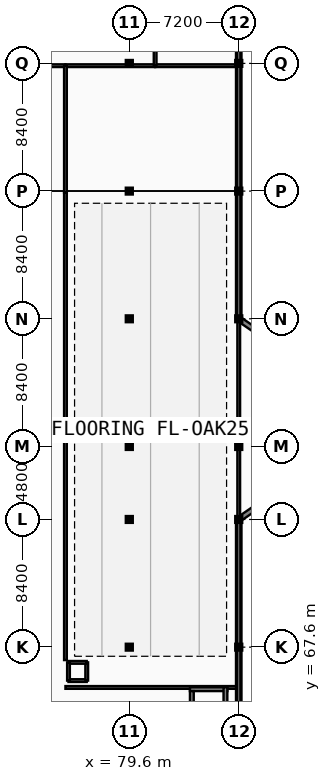
"""IFC4 building model, lengths in metres.
Left out: names, types, materials, properties, quantities, classifications, styles, units other than length and angle.
Written with IfcOpenShell. Run it as: python <this file> out.ifc"""

import sys

from ifc_helpers import new_model, si_unit, direction, frame, frame_2d, origin, origin_2d, place, context, subcontext, project, spatial, rectangle, i_section, extrude, element, fill, save


model = new_model("IFC4")
c1 = context("Model", 3, precision=1e-05, world=origin(), true_north=direction((0.0, 1.0)))
c2 = subcontext(c1, "Body", "Model", "MODEL_VIEW")
j1 = project(units=[si_unit("LENGTHUNIT", "METRE"), si_unit("PLANEANGLEUNIT", "RADIAN")], contexts=[c1])
p1 = place(None, origin())
s1 = spatial("IfcSite", under=j1, at=p1, CompositionType="ELEMENT")
p2 = place(p1, origin())
s2 = spatial("IfcBuilding", under=s1, at=p2, CompositionType="ELEMENT")
p3 = place(p2, frame((0.0, 0.0, 21.6)))
s3 = spatial("IfcBuildingStorey", under=s2, at=p3, CompositionType="ELEMENT", Elevation=21.6)
for number, where, z_axis, x_axis in (
    (1, (79.6, 67.6, 0.0), (0.0, 0.0, 1.0), (1.0, 0.0, 0.0)),
    (2, (79.6, 76.0, 0.0), (0.0, 0.0, 1.0), (1.0, 0.0, 0.0)),
    (3, (79.6, 80.8, 0.0), (0.0, 0.0, 1.0), (1.0, 0.0, 0.0)),
    (4, (79.6, 89.2, 0.0), (0.0, 0.0, 1.0), (1.0, 0.0, 0.0)),
    (5, (79.6, 97.6, 0.0), (0.0, 0.0, 1.0), (1.0, 0.0, 0.0)),
    (6, (79.6, 106.0, 0.0), (0.0, 0.0, 1.0), (1.0, 0.0, 0.0)),
    (7, (86.8, 67.6, 0.0), (0.0, 0.0, 1.0), (1.0, 0.0, 0.0)),
    (8, (86.8, 76.0, 0.0), (0.0, 0.0, 1.0), (1.0, 0.0, 0.0)),
    (9, (86.8, 80.8, 0.0), (0.0, 0.0, 1.0), (1.0, 0.0, 0.0)),
    (10, (86.8, 89.2, 0.0), (0.0, 0.0, 1.0), (1.0, 0.0, 0.0)),
    (11, (86.8, 97.6, 0.0), (0.0, 0.0, 1.0), (1.0, 0.0, 0.0)),
    (12, (86.8, 106.0, 0.0), (0.0, 0.0, 1.0), (1.0, 0.0, 0.0)),
):
    element("IfcColumn", number, at=place(p3, frame(where, z_axis=z_axis, x_axis=x_axis)), inside=s3, PredefinedType="COLUMN", context=c2, shape_type="SweptSolid", body=[
        extrude(i_section(OverallWidth=0.3, OverallDepth=0.29, WebThickness=0.009, FlangeThickness=0.014, at=origin_2d()), origin(), (0.0, 0.0, 1.0), 3.6),
    ])
p4 = place(p3, frame((60.3, 105.85, 0.0), z_axis=(0.0, 0.0, 1.0), x_axis=(1.0, 0.0, 0.0)))
e13 = element("IfcWall", 13, at=p4, inside=s3, PredefinedType="PARTITIONING", context=c2, shape_type="SweptSolid", body=[
    extrude(rectangle(XDim=15.1, YDim=0.18, at=frame_2d((7.55, 0.0))), origin(), (0.0, 0.0, 1.0), 2.71),
])
p5 = place(p4, frame((7.05, 0.0, -0.01)))
e14 = element("IfcOpeningElement", 14, at=p5, cuts=e13, PredefinedType="OPENING", context=c2, shape_type="SweptSolid", body=[
    extrude(rectangle(XDim=1.0, YDim=2.16, at=frame_2d((0.5, 1.08))), frame((0.0, 0.1, 0.0), z_axis=(0.0, -1.0, 0.0), x_axis=(1.0, 0.0, 0.0)), (0.0, 0.0, 1.0), 0.2),
])
p6 = place(p3, frame((75.4, 105.85, 0.0), z_axis=(0.0, 0.0, 1.0), x_axis=(1.0, 0.0, 0.0)))
e15 = element("IfcWall", 15, at=p6, inside=s3, PredefinedType="PARTITIONING", context=c2, shape_type="SweptSolid", body=[
    extrude(rectangle(XDim=5.9, YDim=0.18, at=frame_2d((2.95, 0.0))), origin(), (0.0, 0.0, 1.0), 2.71),
])
p7 = place(p3, frame((81.3, 105.85, 0.0), z_axis=(0.0, 0.0, 1.0), x_axis=(1.0, 0.0, 0.0)))
e16 = element("IfcWall", 16, at=p7, inside=s3, PredefinedType="PARTITIONING", context=c2, shape_type="SweptSolid", body=[
    extrude(rectangle(XDim=5.36, YDim=0.18, at=frame_2d((2.68, 0.0))), origin(), (0.0, 0.0, 1.0), 2.71),
])
p8 = place(p7, frame((2.18, 0.0, -0.01)))
e17 = element("IfcOpeningElement", 17, at=p8, cuts=e16, PredefinedType="OPENING", context=c2, shape_type="SweptSolid", body=[
    extrude(rectangle(XDim=1.0, YDim=2.16, at=frame_2d((0.5, 1.08))), frame((0.0, 0.1, 0.0), z_axis=(0.0, -1.0, 0.0), x_axis=(1.0, 0.0, 0.0)), (0.0, 0.0, 1.0), 0.2),
])
p9 = place(p3, frame((81.3, 105.85, 0.0), z_axis=(0.0, 0.0, 1.0), x_axis=(0.0, 1.0, 0.0)))
e18 = element("IfcWall", 18, at=p9, inside=s3, PredefinedType="PARTITIONING", context=c2, shape_type="SweptSolid", body=[
    extrude(rectangle(XDim=4.15, YDim=0.18, at=frame_2d((2.075, 0.0))), origin(), (0.0, 0.0, 1.0), 2.71),
])
p10 = place(p9, frame((1.575, 0.0, -0.01)))
e19 = element("IfcOpeningElement", 19, at=p10, cuts=e18, PredefinedType="OPENING", context=c2, shape_type="SweptSolid", body=[
    extrude(rectangle(XDim=1.0, YDim=2.16, at=frame_2d((0.5, 1.08))), frame((0.0, 0.1, 0.0), z_axis=(0.0, -1.0, 0.0), x_axis=(1.0, 0.0, 0.0)), (0.0, 0.0, 1.0), 0.2),
])
p11 = place(p3, frame((75.4, 64.95, 0.0), z_axis=(0.0, 0.0, 1.0), x_axis=(1.0, 0.0, 0.0)))
e20 = element("IfcWall", 20, at=p11, inside=s3, PredefinedType="PARTITIONING", context=c2, shape_type="SweptSolid", body=[
    extrude(rectangle(XDim=11.26, YDim=0.18, at=frame_2d((5.63, 0.0))), origin(), (0.0, 0.0, 1.0), 2.79),
])
p12 = place(p3, frame((75.4, 66.75, 0.0), z_axis=(0.0, 0.0, 1.0), x_axis=(0.0, 1.0, 0.0)))
e21 = element("IfcWall", 21, at=p12, inside=s3, PredefinedType="PARTITIONING", context=c2, shape_type="SweptSolid", body=[
    extrude(rectangle(XDim=30.75, YDim=0.18, at=frame_2d((15.375, 0.0))), origin(), (0.0, 0.0, 1.0), 2.71),
])
p13 = place(p12, frame((6.413, 0.0, -0.01)))
e22 = element("IfcOpeningElement", 22, at=p13, cuts=e21, PredefinedType="OPENING", context=c2, shape_type="SweptSolid", body=[
    extrude(rectangle(XDim=1.6, YDim=2.21, at=frame_2d((0.8, 1.105))), frame((0.0, 0.1, 0.0), z_axis=(0.0, -1.0, 0.0), x_axis=(1.0, 0.0, 0.0)), (0.0, 0.0, 1.0), 0.2),
])
p14 = place(p3, frame((75.4, 97.5, 0.0), z_axis=(0.0, 0.0, 1.0), x_axis=(0.0, 1.0, 0.0)))
e23 = element("IfcWall", 23, at=p14, inside=s3, PredefinedType="PARTITIONING", context=c2, shape_type="SweptSolid", body=[
    extrude(rectangle(XDim=8.35, YDim=0.18, at=frame_2d((4.175, 0.0))), origin(), (0.0, 0.0, 1.0), 2.71),
])
p15 = place(p3, frame((86.8, 76.0, 0.0), z_axis=(0.0, 0.0, 1.0), x_axis=(0.0, 1.0, 0.0)))
e24 = element("IfcWall", 24, at=p15, inside=s3, PredefinedType="PARTITIONING", context=c2, shape_type="SweptSolid", body=[
    extrude(rectangle(XDim=13.2, YDim=0.18, at=frame_2d((6.6, 0.0))), origin(), (0.0, 0.0, 1.0), 2.71),
])
p16 = place(p15, frame((5.8, 0.0, -0.01)))
e25 = element("IfcOpeningElement", 25, at=p16, cuts=e24, PredefinedType="OPENING", context=c2, shape_type="SweptSolid", body=[
    extrude(rectangle(XDim=1.6, YDim=2.21, at=frame_2d((0.8, 1.105))), frame((0.0, 0.1, 0.0), z_axis=(0.0, -1.0, 0.0), x_axis=(1.0, 0.0, 0.0)), (0.0, 0.0, 1.0), 0.2),
])
p17 = place(p3, frame((86.8, 97.6, 0.0), z_axis=(0.0, 0.0, 1.0), x_axis=(0.0, 1.0, 0.0)))
e26 = element("IfcWall", 26, at=p17, inside=s3, PredefinedType="SOLIDWALL", context=c2, shape_type="SweptSolid", body=[
    extrude(rectangle(XDim=8.4, YDim=0.36, at=frame_2d((4.2, 0.0))), origin(), (0.0, 0.0, 1.0), 2.71),
])
p18 = place(p17, frame((0.46, 0.0, 0.75)))
e27 = element("IfcOpeningElement", 27, at=p18, cuts=e26, PredefinedType="OPENING", context=c2, shape_type="SweptSolid", body=[
    extrude(rectangle(XDim=1.55, YDim=1.82, at=frame_2d((0.775, 0.91))), frame((0.0, 0.19, 0.0), z_axis=(0.0, -1.0, 0.0), x_axis=(1.0, 0.0, 0.0)), (0.0, 0.0, 1.0), 0.38),
])
p19 = place(p17, frame((6.26, 0.0, 0.75)))
e28 = element("IfcOpeningElement", 28, at=p19, cuts=e26, PredefinedType="OPENING", context=c2, shape_type="SweptSolid", body=[
    extrude(rectangle(XDim=1.55, YDim=1.82, at=frame_2d((0.775, 0.91))), frame((0.0, 0.19, 0.0), z_axis=(0.0, -1.0, 0.0), x_axis=(1.0, 0.0, 0.0)), (0.0, 0.0, 1.0), 0.38),
])
p20 = place(p3, frame((86.8, 106.0, 0.0), z_axis=(0.0, 0.0, 1.0), x_axis=(0.0, 1.0, 0.0)))
e29 = element("IfcWall", 29, at=p20, inside=s3, PredefinedType="SOLIDWALL", context=c2, shape_type="SweptSolid", body=[
    extrude(rectangle(XDim=9.0, YDim=0.36, at=frame_2d((4.5, 0.0))), origin(), (0.0, 0.0, 1.0), 2.71),
])
p21 = place(p20, frame((0.46, 0.0, 0.75)))
e30 = element("IfcOpeningElement", 30, at=p21, cuts=e29, PredefinedType="OPENING", context=c2, shape_type="SweptSolid", body=[
    extrude(rectangle(XDim=1.55, YDim=1.82, at=frame_2d((0.775, 0.91))), frame((0.0, 0.19, 0.0), z_axis=(0.0, -1.0, 0.0), x_axis=(1.0, 0.0, 0.0)), (0.0, 0.0, 1.0), 0.38),
])
p22 = place(p20, frame((6.86, 0.0, 0.75)))
e31 = element("IfcOpeningElement", 31, at=p22, cuts=e29, PredefinedType="OPENING", context=c2, shape_type="SweptSolid", body=[
    extrude(rectangle(XDim=1.55, YDim=1.82, at=frame_2d((0.775, 0.91))), frame((0.0, 0.19, 0.0), z_axis=(0.0, -1.0, 0.0), x_axis=(1.0, 0.0, 0.0)), (0.0, 0.0, 1.0), 0.38),
])
p23 = place(p3, frame((86.8, 59.2, 0.0), z_axis=(0.0, 0.0, 1.0), x_axis=(0.0, 1.0, 0.0)))
e32 = element("IfcWall", 32, at=p23, inside=s3, PredefinedType="SOLIDWALL", context=c2, shape_type="SweptSolid", body=[
    extrude(rectangle(XDim=8.4, YDim=0.36, at=frame_2d((4.2, 0.0))), origin(), (0.0, 0.0, 1.0), 2.71),
])
p24 = place(p23, frame((0.46, 0.0, 0.75)))
e33 = element("IfcOpeningElement", 33, at=p24, cuts=e32, PredefinedType="OPENING", context=c2, shape_type="SweptSolid", body=[
    extrude(rectangle(XDim=1.55, YDim=1.82, at=frame_2d((0.775, 0.91))), frame((0.0, 0.19, 0.0), z_axis=(0.0, -1.0, 0.0), x_axis=(1.0, 0.0, 0.0)), (0.0, 0.0, 1.0), 0.38),
])
p25 = place(p23, frame((6.26, 0.0, 0.75)))
e34 = element("IfcOpeningElement", 34, at=p25, cuts=e32, PredefinedType="OPENING", context=c2, shape_type="SweptSolid", body=[
    extrude(rectangle(XDim=1.55, YDim=1.82, at=frame_2d((0.775, 0.91))), frame((0.0, 0.19, 0.0), z_axis=(0.0, -1.0, 0.0), x_axis=(1.0, 0.0, 0.0)), (0.0, 0.0, 1.0), 0.38),
])
p26 = place(p3, frame((86.8, 67.6, 0.0), z_axis=(0.0, 0.0, 1.0), x_axis=(0.0, 1.0, 0.0)))
e35 = element("IfcWall", 35, at=p26, inside=s3, PredefinedType="SOLIDWALL", context=c2, shape_type="SweptSolid", body=[
    extrude(rectangle(XDim=8.4, YDim=0.36, at=frame_2d((4.2, 0.0))), origin(), (0.0, 0.0, 1.0), 2.71),
])
p27 = place(p26, frame((0.46, 0.0, 0.75)))
e36 = element("IfcOpeningElement", 36, at=p27, cuts=e35, PredefinedType="OPENING", context=c2, shape_type="SweptSolid", body=[
    extrude(rectangle(XDim=1.55, YDim=1.82, at=frame_2d((0.775, 0.91))), frame((0.0, 0.19, 0.0), z_axis=(0.0, -1.0, 0.0), x_axis=(1.0, 0.0, 0.0)), (0.0, 0.0, 1.0), 0.38),
])
p28 = place(p26, frame((6.26, 0.0, 0.75)))
e37 = element("IfcOpeningElement", 37, at=p28, cuts=e35, PredefinedType="OPENING", context=c2, shape_type="SweptSolid", body=[
    extrude(rectangle(XDim=1.55, YDim=1.82, at=frame_2d((0.775, 0.91))), frame((0.0, 0.19, 0.0), z_axis=(0.0, -1.0, 0.0), x_axis=(1.0, 0.0, 0.0)), (0.0, 0.0, 1.0), 0.38),
])
p29 = place(p3, frame((86.8, 89.2, 0.0), z_axis=(0.0, 0.0, 1.0), x_axis=(0.0, 1.0, 0.0)))
e38 = element("IfcWall", 38, at=p29, inside=s3, PredefinedType="SOLIDWALL", context=c2, shape_type="SweptSolid", body=[
    extrude(rectangle(XDim=8.4, YDim=0.36, at=frame_2d((4.2, 0.0))), origin(), (0.0, 0.0, 1.0), 2.71),
])
p30 = place(p29, frame((0.46, 0.0, 0.75)))
e39 = element("IfcOpeningElement", 39, at=p30, cuts=e38, PredefinedType="OPENING", context=c2, shape_type="SweptSolid", body=[
    extrude(rectangle(XDim=1.55, YDim=1.82, at=frame_2d((0.775, 0.91))), frame((0.0, 0.19, 0.0), z_axis=(0.0, -1.0, 0.0), x_axis=(1.0, 0.0, 0.0)), (0.0, 0.0, 1.0), 0.38),
])
p31 = place(p29, frame((6.26, 0.0, 0.75)))
e40 = element("IfcOpeningElement", 40, at=p31, cuts=e38, PredefinedType="OPENING", context=c2, shape_type="SweptSolid", body=[
    extrude(rectangle(XDim=1.55, YDim=1.82, at=frame_2d((0.775, 0.91))), frame((0.0, 0.19, 0.0), z_axis=(0.0, -1.0, 0.0), x_axis=(1.0, 0.0, 0.0)), (0.0, 0.0, 1.0), 0.38),
])
for number, where, z_axis, x_axis in (
    (41, (87.03, 76.159, 0.0), (0.0, 0.0, 1.0), (0.822, 0.569, 0.0)),
    (42, (87.211, 88.915, 0.0), (0.0, 0.0, 1.0), (-0.822, 0.569, 0.0)),
):
    element("IfcWall", number, at=place(p3, frame(where, z_axis=z_axis, x_axis=x_axis)), inside=s3, PredefinedType="SOLIDWALL", context=c2, shape_type="SweptSolid", body=[
        extrude(rectangle(XDim=0.22, YDim=0.24, at=frame_2d((0.11, 0.0))), origin(), (0.0, 0.0, 1.0), 2.71),
    ])
for number, where, z_axis, x_axis in (
    (43, (86.8, 76.0, 3.6), (0.0, 0.0, 1.0), (0.822, 0.569, 0.0)),
    (44, (89.4, 87.4, 3.6), (0.0, 0.0, 1.0), (-0.822, 0.569, 0.0)),
):
    element("IfcWall", number, at=place(p3, frame(where, z_axis=z_axis, x_axis=x_axis)), inside=s3, PredefinedType="PARAPET", context=c2, shape_type="SweptSolid", body=[
        extrude(rectangle(XDim=3.162, YDim=0.32, at=frame_2d((1.581, 0.0))), origin(), (0.0, 0.0, 1.0), 0.95),
    ])
p32 = place(p3, frame((86.8, 89.2, 3.6), z_axis=(0.0, 0.0, 1.0), x_axis=(0.0, 1.0, 0.0)))
e45 = element("IfcWall", 45, at=p32, inside=s3, PredefinedType="PARAPET", context=c2, shape_type="SweptSolid", body=[
    extrude(rectangle(XDim=25.8, YDim=0.22, at=frame_2d((12.9, 0.0))), origin(), (0.0, 0.0, 1.0), 1.2),
])
p33 = place(p3, frame((86.8, 50.8, 3.6), z_axis=(0.0, 0.0, 1.0), x_axis=(0.0, 1.0, 0.0)))
e46 = element("IfcWall", 46, at=p33, inside=s3, PredefinedType="PARAPET", context=c2, shape_type="SweptSolid", body=[
    extrude(rectangle(XDim=25.2, YDim=0.22, at=frame_2d((12.6, 0.0))), origin(), (0.0, 0.0, 1.0), 1.2),
])
p34 = place(p3, frame((83.59, 64.835, 0.0), z_axis=(0.0, 0.0, 1.0), x_axis=(1.0, 0.0, 0.0)))
e47 = element("IfcWall", 47, at=p34, inside=s3, PredefinedType="SHEAR", context=c2, shape_type="SweptSolid", body=[
    extrude(rectangle(XDim=2.46, YDim=0.25, at=frame_2d((1.23, 0.0))), origin(), (0.0, 0.0, 1.0), 3.6),
])
p35 = place(p3, frame((83.715, 62.25, 0.0), z_axis=(0.0, 0.0, 1.0), x_axis=(0.0, 1.0, 0.0)))
e48 = element("IfcWall", 48, at=p35, inside=s3, PredefinedType="SHEAR", context=c2, shape_type="SweptSolid", body=[
    extrude(rectangle(XDim=2.46, YDim=0.25, at=frame_2d((1.23, 0.0))), origin(), (0.0, 0.0, 1.0), 3.6),
])
p36 = place(p35, frame((0.68, 0.0, -0.01)))
e49 = element("IfcOpeningElement", 49, at=p36, cuts=e48, PredefinedType="OPENING", context=c2, shape_type="SweptSolid", body=[
    extrude(rectangle(XDim=1.1, YDim=2.16, at=frame_2d((0.55, 1.08))), frame((0.0, 0.135, 0.0), z_axis=(0.0, -1.0, 0.0), x_axis=(1.0, 0.0, 0.0)), (0.0, 0.0, 1.0), 0.27),
])
p37 = place(p3, frame((85.925, 62.25, 0.0), z_axis=(0.0, 0.0, 1.0), x_axis=(0.0, 1.0, 0.0)))
e50 = element("IfcWall", 50, at=p37, inside=s3, PredefinedType="SHEAR", context=c2, shape_type="SweptSolid", body=[
    extrude(rectangle(XDim=2.71, YDim=0.25, at=frame_2d((1.355, 0.0))), origin(), (0.0, 0.0, 1.0), 3.6),
])
p38 = place(p3, frame((75.6, 65.4, 0.0), z_axis=(0.0, 0.0, 1.0), x_axis=(1.0, 0.0, 0.0)))
e51 = element("IfcWall", 51, at=p38, inside=s3, PredefinedType="SOLIDWALL", context=c2, shape_type="SweptSolid", body=[
    extrude(rectangle(XDim=1.2, YDim=0.18, at=frame_2d((0.6, 0.0))), origin(), (0.0, 0.0, 1.0), 3.35),
])
p39 = place(p3, frame((76.8, 65.4, 0.0), z_axis=(0.0, 0.0, 1.0), x_axis=(0.0, 1.0, 0.0)))
e52 = element("IfcWall", 52, at=p39, inside=s3, PredefinedType="SOLIDWALL", context=c2, shape_type="SweptSolid", body=[
    extrude(rectangle(XDim=1.2, YDim=0.18, at=frame_2d((0.6, 0.0))), origin(), (0.0, 0.0, 1.0), 3.35),
])
p40 = place(p3, frame((76.8, 66.6, 0.0), z_axis=(0.0, 0.0, 1.0), x_axis=(-1.0, 0.0, 0.0)))
e53 = element("IfcWall", 53, at=p40, inside=s3, PredefinedType="SOLIDWALL", context=c2, shape_type="SweptSolid", body=[
    extrude(rectangle(XDim=1.2, YDim=0.18, at=frame_2d((0.6, 0.0))), origin(), (0.0, 0.0, 1.0), 3.35),
])
p41 = place(p3, frame((75.6, 66.6, 0.0), z_axis=(0.0, 0.0, 1.0), x_axis=(0.0, -1.0, 0.0)))
e54 = element("IfcWall", 54, at=p41, inside=s3, PredefinedType="SOLIDWALL", context=c2, shape_type="SweptSolid", body=[
    extrude(rectangle(XDim=1.2, YDim=0.18, at=frame_2d((0.6, 0.0))), origin(), (0.0, 0.0, 1.0), 3.35),
])
p42 = place(p41, frame((0.2, 0.0, -0.01)))
e55 = element("IfcOpeningElement", 55, at=p42, cuts=e54, PredefinedType="OPENING", context=c2, shape_type="SweptSolid", body=[
    extrude(rectangle(XDim=0.8, YDim=2.06, at=frame_2d((0.4, 1.03))), frame((0.0, 0.1, 0.0), z_axis=(0.0, -1.0, 0.0), x_axis=(1.0, 0.0, 0.0)), (0.0, 0.0, 1.0), 0.2),
])
p43 = place(p8, frame((0.0, 0.0, 0.01)))
e56 = element("IfcDoor", 56, at=p43, inside=s3, OperationType="SINGLE_SWING_LEFT", PredefinedType="DOOR", context=c2, shape_type="SweptSolid", body=[
    extrude(rectangle(XDim=1.0, YDim=2.15, at=frame_2d((0.5, 1.075))), frame((0.0, 0.025, 0.0), z_axis=(0.0, -1.0, 0.0), x_axis=(1.0, 0.0, 0.0)), (0.0, 0.0, 1.0), 0.05),
])
fill(e17, e56)
p44 = place(p13, frame((0.0, 0.0, 0.01)))
e57 = element("IfcDoor", 57, at=p44, inside=s3, OperationType="DOUBLE_SWING_LEFT", PredefinedType="DOOR", context=c2, shape_type="SweptSolid", body=[
    extrude(rectangle(XDim=1.6, YDim=2.2, at=frame_2d((0.8, 1.1))), frame((0.0, 0.025, 0.0), z_axis=(0.0, -1.0, 0.0), x_axis=(1.0, 0.0, 0.0)), (0.0, 0.0, 1.0), 0.05),
])
fill(e22, e57)
p45 = place(p16, frame((1.6, 0.0, 0.01), z_axis=(0.0, 0.0, 1.0), x_axis=(-1.0, 0.0, 0.0)))
e58 = element("IfcDoor", 58, at=p45, inside=s3, OperationType="DOUBLE_SWING_LEFT", PredefinedType="DOOR", context=c2, shape_type="SweptSolid", body=[
    extrude(rectangle(XDim=1.6, YDim=2.2, at=frame_2d((0.8, 1.1))), frame((0.0, 0.025, 0.0), z_axis=(0.0, -1.0, 0.0), x_axis=(1.0, 0.0, 0.0)), (0.0, 0.0, 1.0), 0.05),
])
fill(e25, e58)
p46 = place(p18, origin())
e59 = element("IfcWindow", 59, at=p46, inside=s3, PartitioningType="DOUBLE_PANEL_HORIZONTAL", PredefinedType="WINDOW", context=c2, shape_type="SweptSolid", body=[
    extrude(rectangle(XDim=1.55, YDim=1.82, at=frame_2d((0.775, 0.91))), frame((0.0, 0.03, 0.0), z_axis=(0.0, -1.0, 0.0), x_axis=(1.0, 0.0, 0.0)), (0.0, 0.0, 1.0), 0.06),
])
fill(e27, e59)
p47 = place(p19, origin())
e60 = element("IfcWindow", 60, at=p47, inside=s3, PartitioningType="DOUBLE_PANEL_HORIZONTAL", PredefinedType="WINDOW", context=c2, shape_type="SweptSolid", body=[
    extrude(rectangle(XDim=1.55, YDim=1.82, at=frame_2d((0.775, 0.91))), frame((0.0, 0.03, 0.0), z_axis=(0.0, -1.0, 0.0), x_axis=(1.0, 0.0, 0.0)), (0.0, 0.0, 1.0), 0.06),
])
fill(e28, e60)
p48 = place(p21, origin())
e61 = element("IfcWindow", 61, at=p48, inside=s3, PartitioningType="DOUBLE_PANEL_HORIZONTAL", PredefinedType="WINDOW", context=c2, shape_type="SweptSolid", body=[
    extrude(rectangle(XDim=1.55, YDim=1.82, at=frame_2d((0.775, 0.91))), frame((0.0, 0.03, 0.0), z_axis=(0.0, -1.0, 0.0), x_axis=(1.0, 0.0, 0.0)), (0.0, 0.0, 1.0), 0.06),
])
fill(e30, e61)
p49 = place(p25, origin())
e62 = element("IfcWindow", 62, at=p49, inside=s3, PartitioningType="DOUBLE_PANEL_HORIZONTAL", PredefinedType="WINDOW", context=c2, shape_type="SweptSolid", body=[
    extrude(rectangle(XDim=1.55, YDim=1.82, at=frame_2d((0.775, 0.91))), frame((0.0, 0.03, 0.0), z_axis=(0.0, -1.0, 0.0), x_axis=(1.0, 0.0, 0.0)), (0.0, 0.0, 1.0), 0.06),
])
fill(e34, e62)
p50 = place(p27, origin())
e63 = element("IfcWindow", 63, at=p50, inside=s3, PartitioningType="DOUBLE_PANEL_HORIZONTAL", PredefinedType="WINDOW", context=c2, shape_type="SweptSolid", body=[
    extrude(rectangle(XDim=1.55, YDim=1.82, at=frame_2d((0.775, 0.91))), frame((0.0, 0.03, 0.0), z_axis=(0.0, -1.0, 0.0), x_axis=(1.0, 0.0, 0.0)), (0.0, 0.0, 1.0), 0.06),
])
fill(e36, e63)
p51 = place(p28, origin())
e64 = element("IfcWindow", 64, at=p51, inside=s3, PartitioningType="DOUBLE_PANEL_HORIZONTAL", PredefinedType="WINDOW", context=c2, shape_type="SweptSolid", body=[
    extrude(rectangle(XDim=1.55, YDim=1.82, at=frame_2d((0.775, 0.91))), frame((0.0, 0.03, 0.0), z_axis=(0.0, -1.0, 0.0), x_axis=(1.0, 0.0, 0.0)), (0.0, 0.0, 1.0), 0.06),
])
fill(e37, e64)
p52 = place(p30, origin())
e65 = element("IfcWindow", 65, at=p52, inside=s3, PartitioningType="DOUBLE_PANEL_HORIZONTAL", PredefinedType="WINDOW", context=c2, shape_type="SweptSolid", body=[
    extrude(rectangle(XDim=1.55, YDim=1.82, at=frame_2d((0.775, 0.91))), frame((0.0, 0.03, 0.0), z_axis=(0.0, -1.0, 0.0), x_axis=(1.0, 0.0, 0.0)), (0.0, 0.0, 1.0), 0.06),
])
fill(e39, e65)
p53 = place(p31, origin())
e66 = element("IfcWindow", 66, at=p53, inside=s3, PartitioningType="DOUBLE_PANEL_HORIZONTAL", PredefinedType="WINDOW", context=c2, shape_type="SweptSolid", body=[
    extrude(rectangle(XDim=1.55, YDim=1.82, at=frame_2d((0.775, 0.91))), frame((0.0, 0.03, 0.0), z_axis=(0.0, -1.0, 0.0), x_axis=(1.0, 0.0, 0.0)), (0.0, 0.0, 1.0), 0.06),
])
fill(e40, e66)
p54 = place(p42, frame((0.0, 0.0, 0.01)))
e67 = element("IfcDoor", 67, at=p54, inside=s3, OperationType="SINGLE_SWING_LEFT", PredefinedType="DOOR", context=c2, shape_type="SweptSolid", body=[
    extrude(rectangle(XDim=0.8, YDim=2.05, at=frame_2d((0.4, 1.025))), frame((0.0, 0.025, 0.0), z_axis=(0.0, -1.0, 0.0), x_axis=(1.0, 0.0, 0.0)), (0.0, 0.0, 1.0), 0.05),
])
fill(e55, e67)
save(model, sys.argv[1])
